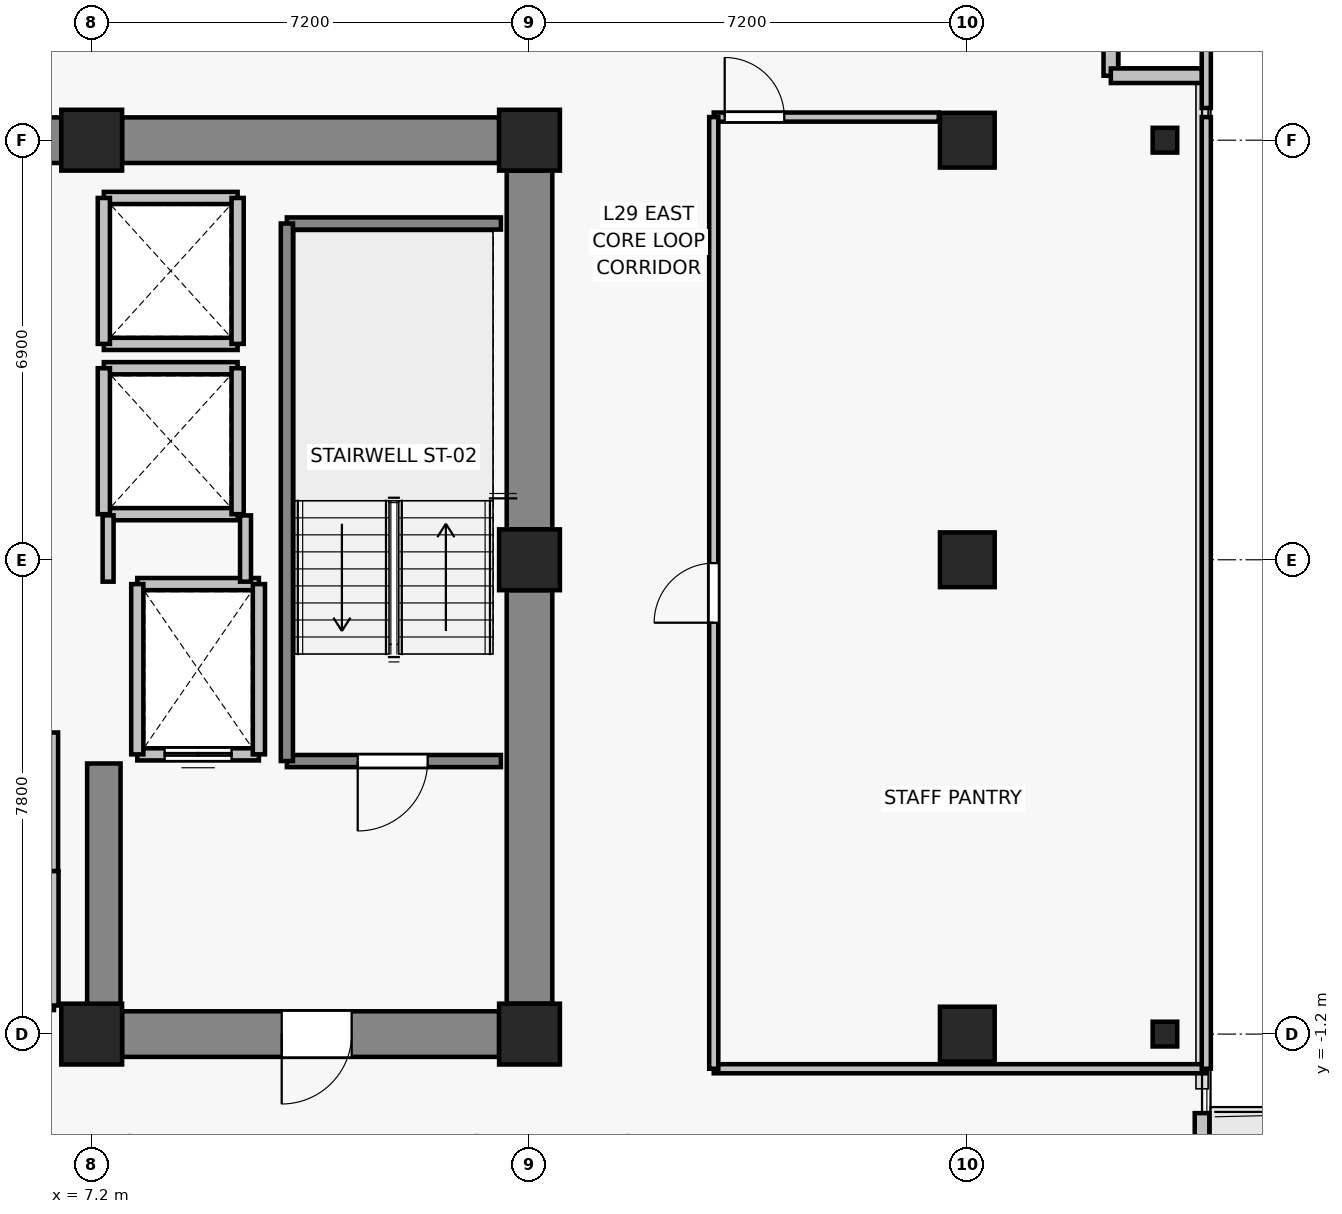
"""IFC4 building model, lengths in metres.
Left out: names, types, materials, properties, quantities, classifications, styles, units other than length and angle.
Written with IfcOpenShell. Run it as: python <this file> out.ifc"""

import sys

from ifc_helpers import new_model, si_unit, direction, frame, frame_2d, origin, origin_2d, place, context, subcontext, project, spatial, rectangle, i_section, extrude, source, transform, mapped, element, fill, save


model = new_model("IFC4")
c1 = context("Model", 3, precision=1e-05, world=origin(), true_north=direction((0.0, 1.0)))
c2 = subcontext(c1, "Body", "Model", "MODEL_VIEW")
j1 = project(units=[si_unit("LENGTHUNIT", "METRE"), si_unit("PLANEANGLEUNIT", "RADIAN")], contexts=[c1])
p1 = place(None, origin())
s1 = spatial("IfcSite", under=j1, at=p1, CompositionType="ELEMENT")
p2 = place(p1, origin())
s2 = spatial("IfcBuilding", under=s1, at=p2, CompositionType="ELEMENT")
p3 = place(p2, frame((0.0, 0.0, 106.6)))
s3 = spatial("IfcBuildingStorey", under=s2, at=p3, CompositionType="ELEMENT", Elevation=106.6)
for number, where, z_axis, x_axis in (
    (1, (7.2, -1.2, 0.0), (0.0, 0.0, 1.0), (1.0, 0.0, 0.0)),
    (2, (14.4, -1.2, 0.0), (0.0, 0.0, 1.0), (1.0, 0.0, 0.0)),
    (3, (14.4, 6.6, 0.0), (0.0, 0.0, 1.0), (1.0, 0.0, 0.0)),
    (4, (7.2, 13.5, 0.0), (0.0, 0.0, 1.0), (1.0, 0.0, 0.0)),
    (5, (14.4, 13.5, 0.0), (0.0, 0.0, 1.0), (1.0, 0.0, 0.0)),
):
    element("IfcColumn", number, at=place(p3, frame(where, z_axis=z_axis, x_axis=x_axis)), inside=s3, PredefinedType="COLUMN", context=c2, shape_type="SweptSolid", body=[
        extrude(rectangle(XDim=1.0, YDim=1.0, at=origin_2d()), origin(), (0.0, 0.0, 1.0), 3.3),
    ])
for number, where, z_axis, x_axis in (
    (6, (21.6, -1.2, 0.0), (0.0, 0.0, 1.0), (1.0, 0.0, 0.0)),
    (7, (21.6, 6.6, 0.0), (0.0, 0.0, 1.0), (1.0, 0.0, 0.0)),
    (8, (21.6, 13.5, 0.0), (0.0, 0.0, 1.0), (1.0, 0.0, 0.0)),
):
    element("IfcColumn", number, at=place(p3, frame(where, z_axis=z_axis, x_axis=x_axis)), inside=s3, PredefinedType="COLUMN", context=c2, shape_type="SweptSolid", body=[
        extrude(rectangle(XDim=0.9, YDim=0.9, at=origin_2d()), origin(), (0.0, 0.0, 1.0), 3.3),
    ])
for number, where, z_axis, x_axis in (
    (9, (24.85, -1.2, 0.0), (0.0, 0.0, 1.0), (1.0, 0.0, 0.0)),
    (10, (24.85, 13.5, 0.0), (0.0, 0.0, 1.0), (1.0, 0.0, 0.0)),
):
    element("IfcColumn", number, at=place(p3, frame(where, z_axis=z_axis, x_axis=x_axis)), inside=s3, PredefinedType="COLUMN", context=c2, shape_type="SweptSolid", body=[
        extrude(i_section(OverallWidth=0.404, OverallDepth=0.407, WebThickness=0.022, FlangeThickness=0.032, FilletRadius=0.015, at=origin_2d()), origin(), (0.0, 0.0, 1.0), 3.3),
    ])
p4 = place(p3, frame((-6.7, 13.5, 0.0), z_axis=(0.0, 0.0, 1.0), x_axis=(1.0, 0.0, 0.0)))
e11 = element("IfcWall", 11, at=p4, inside=s3, PredefinedType="SHEAR", context=c2, shape_type="SweptSolid", body=[
    extrude(rectangle(XDim=13.4, YDim=0.75, at=frame_2d((6.7, 0.0))), origin(), (0.0, 0.0, 1.0), 3.075),
])
p5 = place(p3, frame((7.7, 13.5, 0.0), z_axis=(0.0, 0.0, 1.0), x_axis=(1.0, 0.0, 0.0)))
e12 = element("IfcWall", 12, at=p5, inside=s3, PredefinedType="SHEAR", context=c2, shape_type="SweptSolid", body=[
    extrude(rectangle(XDim=6.2, YDim=0.75, at=frame_2d((3.1, 0.0))), origin(), (0.0, 0.0, 1.0), 3.075),
])
p6 = place(p3, frame((14.4, -0.7, 0.0), z_axis=(0.0, 0.0, 1.0), x_axis=(0.0, 1.0, 0.0)))
e13 = element("IfcWall", 13, at=p6, inside=s3, PredefinedType="SHEAR", context=c2, shape_type="SweptSolid", body=[
    extrude(rectangle(XDim=6.8, YDim=0.75, at=frame_2d((3.4, 0.0))), origin(), (0.0, 0.0, 1.0), 3.075),
])
p7 = place(p3, frame((14.4, 7.1, 0.0), z_axis=(0.0, 0.0, 1.0), x_axis=(0.0, 1.0, 0.0)))
e14 = element("IfcWall", 14, at=p7, inside=s3, PredefinedType="SHEAR", context=c2, shape_type="SweptSolid", body=[
    extrude(rectangle(XDim=5.9, YDim=0.75, at=frame_2d((2.95, 0.0))), origin(), (0.0, 0.0, 1.0), 3.075),
])
p8 = place(p3, frame((13.9, -1.2, 0.0), z_axis=(0.0, 0.0, 1.0), x_axis=(-1.0, 0.0, 0.0)))
e15 = element("IfcWall", 15, at=p8, inside=s3, PredefinedType="SHEAR", context=c2, shape_type="SweptSolid", body=[
    extrude(rectangle(XDim=6.2, YDim=0.75, at=frame_2d((3.1, 0.0))), origin(), (0.0, 0.0, 1.0), 3.075),
])
p9 = place(p8, frame((2.425, 0.0, 0.0)))
e16 = element("IfcOpeningElement", 16, at=p9, cuts=e15, PredefinedType="OPENING", context=c2, shape_type="SweptSolid", body=[
    extrude(rectangle(XDim=1.15, YDim=2.15, at=frame_2d((0.575, 1.075))), frame((0.0, 0.385, 0.0), z_axis=(0.0, -1.0, 0.0), x_axis=(1.0, 0.0, 0.0)), (0.0, 0.0, 1.0), 0.77),
])
p10 = place(p3, frame((7.4, -0.825, 0.0), z_axis=(0.0, 0.0, 1.0), x_axis=(0.0, 1.0, 0.0)))
e17 = element("IfcWall", 17, at=p10, inside=s3, PredefinedType="SHEAR", context=c2, shape_type="SweptSolid", body=[
    extrude(rectangle(XDim=4.075, YDim=0.55, at=frame_2d((2.038, 0.0))), origin(), (0.0, 0.0, 1.0), 3.075),
])
p11 = place(p3, frame((25.46, -2.5, 0.0), z_axis=(0.0, 0.0, 1.0), x_axis=(0.0, -1.0, 0.0)))
e18 = element("IfcWall", 18, at=p11, inside=s3, PredefinedType="SOLIDWALL", context=c2, shape_type="SweptSolid", body=[
    extrude(rectangle(XDim=5.8, YDim=0.24, at=frame_2d((2.9, 0.0))), origin(), (0.0, 0.0, 1.0), 3.075),
])
p12 = place(p11, frame((0.696, 0.0, 0.0)))
e19 = element("IfcOpeningElement", 19, at=p12, cuts=e18, PredefinedType="OPENING", context=c2, shape_type="SweptSolid", body=[
    extrude(rectangle(XDim=1.0, YDim=2.2, at=frame_2d((0.5, 1.1))), frame((0.0, 0.13, 0.0), z_axis=(0.0, -1.0, 0.0), x_axis=(1.0, 0.0, 0.0)), (0.0, 0.0, 1.0), 0.26),
])
p13 = place(p11, frame((2.046, 0.0, 0.85)))
e20 = element("IfcOpeningElement", 20, at=p13, cuts=e18, PredefinedType="OPENING", context=c2, shape_type="SweptSolid", body=[
    extrude(rectangle(XDim=0.9, YDim=1.35, at=frame_2d((0.45, 0.675))), frame((0.0, 0.13, 0.0), z_axis=(0.0, -1.0, 0.0), x_axis=(1.0, 0.0, 0.0)), (0.0, 0.0, 1.0), 0.26),
])
for number, where, z_axis, x_axis in (
    (21, (23.96, 14.56, 0.0), (0.0, 0.0, 1.0), (0.0, 1.0, 0.0)),
    (22, (25.46, 14.56, 0.0), (0.0, 0.0, 1.0), (-1.0, 0.0, 0.0)),
):
    element("IfcWall", number, at=place(p3, frame(where, z_axis=z_axis, x_axis=x_axis)), inside=s3, PredefinedType="SOLIDWALL", context=c2, shape_type="SweptSolid", body=[
        extrude(rectangle(XDim=1.5, YDim=0.24, at=frame_2d((0.75, 0.0))), origin(), (0.0, 0.0, 1.0), 3.075),
    ])
p14 = place(p3, frame((9.95, 3.4, 0.0), z_axis=(0.0, 0.0, 1.0), x_axis=(-1.0, 0.0, 0.0)))
e23 = element("IfcWall", 23, at=p14, inside=s3, PredefinedType="SOLIDWALL", context=c2, shape_type="SweptSolid", body=[
    extrude(rectangle(XDim=2.0, YDim=0.2, at=frame_2d((1.0, 0.0))), origin(), (0.0, 0.0, 1.0), 3.075),
])
p15 = place(p14, frame((0.45, 0.0, 0.0)))
e24 = element("IfcOpeningElement", 24, at=p15, cuts=e23, PredefinedType="OPENING", context=c2, shape_type="SweptSolid", body=[
    extrude(rectangle(XDim=1.1, YDim=2.2, at=frame_2d((0.55, 1.1))), frame((0.0, 0.11, 0.0), z_axis=(0.0, -1.0, 0.0), x_axis=(1.0, 0.0, 0.0)), (0.0, 0.0, 1.0), 0.22),
])
p16 = place(p3, frame((7.95, 6.2, 0.0), z_axis=(0.0, 0.0, 1.0), x_axis=(1.0, 0.0, 0.0)))
e25 = element("IfcWall", 25, at=p16, inside=s3, PredefinedType="SOLIDWALL", context=c2, shape_type="SweptSolid", body=[
    extrude(rectangle(XDim=2.0, YDim=0.2, at=frame_2d((1.0, 0.0))), origin(), (0.0, 0.0, 1.0), 3.075),
])
for number, where, z_axis, x_axis in (
    (26, (7.95, 3.4, 0.0), (0.0, 0.0, 1.0), (0.0, 1.0, 0.0)),
    (27, (9.95, 6.2, 0.0), (0.0, 0.0, 1.0), (0.0, -1.0, 0.0)),
):
    element("IfcWall", number, at=place(p3, frame(where, z_axis=z_axis, x_axis=x_axis)), inside=s3, PredefinedType="SOLIDWALL", context=c2, shape_type="SweptSolid", body=[
        extrude(rectangle(XDim=2.8, YDim=0.2, at=frame_2d((1.4, 0.0))), origin(), (0.0, 0.0, 1.0), 3.075),
    ])
for number, where, z_axis, x_axis in (
    (28, (9.6, 7.35, 0.0), (0.0, 0.0, 1.0), (-1.0, 0.0, 0.0)),
    (29, (7.4, 9.75, 0.0), (0.0, 0.0, 1.0), (1.0, 0.0, 0.0)),
):
    element("IfcWall", number, at=place(p3, frame(where, z_axis=z_axis, x_axis=x_axis)), inside=s3, PredefinedType="SOLIDWALL", context=c2, shape_type="SweptSolid", body=[
        extrude(rectangle(XDim=2.2, YDim=0.2, at=frame_2d((1.1, 0.0))), origin(), (0.0, 0.0, 1.0), 2.515),
    ])
p17 = place(p3, frame((7.4, 7.35, 0.0), z_axis=(0.0, 0.0, 1.0), x_axis=(0.0, 1.0, 0.0)))
e30 = element("IfcWall", 30, at=p17, inside=s3, PredefinedType="SOLIDWALL", context=c2, shape_type="SweptSolid", body=[
    extrude(rectangle(XDim=2.4, YDim=0.2, at=frame_2d((1.2, 0.0))), origin(), (0.0, 0.0, 1.0), 2.515),
])
p18 = place(p3, frame((9.6, 9.75, 0.0), z_axis=(0.0, 0.0, 1.0), x_axis=(0.0, -1.0, 0.0)))
e31 = element("IfcWall", 31, at=p18, inside=s3, PredefinedType="SOLIDWALL", context=c2, shape_type="SweptSolid", body=[
    extrude(rectangle(XDim=2.4, YDim=0.2, at=frame_2d((1.2, 0.0))), origin(), (0.0, 0.0, 1.0), 3.075),
])
for number, where, z_axis, x_axis in (
    (32, (9.6, 10.15, 0.0), (0.0, 0.0, 1.0), (-1.0, 0.0, 0.0)),
    (33, (7.4, 12.55, 0.0), (0.0, 0.0, 1.0), (1.0, 0.0, 0.0)),
):
    element("IfcWall", number, at=place(p3, frame(where, z_axis=z_axis, x_axis=x_axis)), inside=s3, PredefinedType="SOLIDWALL", context=c2, shape_type="SweptSolid", body=[
        extrude(rectangle(XDim=2.2, YDim=0.2, at=frame_2d((1.1, 0.0))), origin(), (0.0, 0.0, 1.0), 2.515),
    ])
p19 = place(p3, frame((7.4, 10.15, 0.0), z_axis=(0.0, 0.0, 1.0), x_axis=(0.0, 1.0, 0.0)))
e34 = element("IfcWall", 34, at=p19, inside=s3, PredefinedType="SOLIDWALL", context=c2, shape_type="SweptSolid", body=[
    extrude(rectangle(XDim=2.4, YDim=0.2, at=frame_2d((1.2, 0.0))), origin(), (0.0, 0.0, 1.0), 2.515),
])
p20 = place(p3, frame((9.6, 12.55, 0.0), z_axis=(0.0, 0.0, 1.0), x_axis=(0.0, -1.0, 0.0)))
e35 = element("IfcWall", 35, at=p20, inside=s3, PredefinedType="SOLIDWALL", context=c2, shape_type="SweptSolid", body=[
    extrude(rectangle(XDim=2.4, YDim=0.2, at=frame_2d((1.2, 0.0))), origin(), (0.0, 0.0, 1.0), 3.075),
])
p21 = place(p3, frame((13.93, 3.29, 0.0), z_axis=(0.0, 0.0, 1.0), x_axis=(-1.0, 0.0, 0.0)))
e36 = element("IfcWall", 36, at=p21, inside=s3, PredefinedType="SOLIDWALL", context=c2, shape_type="SweptSolid", body=[
    extrude(rectangle(XDim=3.52, YDim=0.2, at=frame_2d((1.76, 0.0))), origin(), (0.0, 0.0, 1.0), 3.075),
])
p22 = place(p21, frame((1.205, 0.0, 0.0)))
e37 = element("IfcOpeningElement", 37, at=p22, cuts=e36, PredefinedType="OPENING", context=c2, shape_type="SweptSolid", body=[
    extrude(rectangle(XDim=1.15, YDim=2.15, at=frame_2d((0.575, 1.075))), frame((0.0, 0.11, 0.0), z_axis=(0.0, -1.0, 0.0), x_axis=(1.0, 0.0, 0.0)), (0.0, 0.0, 1.0), 0.22),
])
p23 = place(p3, frame((10.41, 12.13, 0.0), z_axis=(0.0, 0.0, 1.0), x_axis=(1.0, 0.0, 0.0)))
e38 = element("IfcWall", 38, at=p23, inside=s3, PredefinedType="SOLIDWALL", context=c2, shape_type="SweptSolid", body=[
    extrude(rectangle(XDim=3.52, YDim=0.2, at=frame_2d((1.76, 0.0))), origin(), (0.0, 0.0, 1.0), 3.075),
])
p24 = place(p3, frame((10.41, 3.29, 0.0), z_axis=(0.0, 0.0, 1.0), x_axis=(0.0, 1.0, 0.0)))
e39 = element("IfcWall", 39, at=p24, inside=s3, PredefinedType="SOLIDWALL", context=c2, shape_type="SweptSolid", body=[
    extrude(rectangle(XDim=8.84, YDim=0.2, at=frame_2d((4.42, 0.0))), origin(), (0.0, 0.0, 1.0), 3.075),
])
p25 = place(p3, frame((7.47, 6.24, 0.0), z_axis=(0.0, 0.0, 1.0), x_axis=(0.0, 1.0, 0.0)))
e40 = element("IfcWall", 40, at=p25, inside=s3, PredefinedType="PARTITIONING", context=c2, shape_type="SweptSolid", body=[
    extrude(rectangle(XDim=1.09, YDim=0.18, at=frame_2d((0.545, 0.0))), origin(), (0.0, 0.0, 1.0), 2.515),
])
p26 = place(p3, frame((9.73, 7.33, 0.0), z_axis=(0.0, 0.0, 1.0), x_axis=(0.0, -1.0, 0.0)))
e41 = element("IfcWall", 41, at=p26, inside=s3, PredefinedType="PARTITIONING", context=c2, shape_type="SweptSolid", body=[
    extrude(rectangle(XDim=1.09, YDim=0.18, at=frame_2d((0.545, 0.0))), origin(), (0.0, 0.0, 1.0), 3.075),
])
p27 = place(p3, frame((6.58, 1.48, 0.0), z_axis=(0.0, 0.0, 1.0), x_axis=(-1.0, 0.0, 0.0)))
e42 = element("IfcWall", 42, at=p27, inside=s3, PredefinedType="PARTITIONING", context=c2, shape_type="SweptSolid", body=[
    extrude(rectangle(XDim=5.11, YDim=0.135, at=frame_2d((2.555, 0.0))), origin(), (0.0, 0.0, 1.0), 3.075),
])
p28 = place(p3, frame((6.58, 3.76, 0.0), z_axis=(0.0, 0.0, 1.0), x_axis=(0.0, -1.0, 0.0)))
e43 = element("IfcWall", 43, at=p28, inside=s3, PredefinedType="PARTITIONING", context=c2, shape_type="SweptSolid", body=[
    extrude(rectangle(XDim=2.28, YDim=0.135, at=frame_2d((1.14, 0.0))), origin(), (0.0, 0.0, 1.0), 3.075),
])
p29 = place(p3, frame((6.58, -0.73, 0.0), z_axis=(0.0, 0.0, 1.0), x_axis=(-1.0, 0.0, 0.0)))
e44 = element("IfcWall", 44, at=p29, inside=s3, PredefinedType="PARTITIONING", context=c2, shape_type="SweptSolid", body=[
    extrude(rectangle(XDim=2.4, YDim=0.15, at=frame_2d((1.2, 0.0))), origin(), (0.0, 0.0, 1.0), 3.075),
])
p30 = place(p29, frame((0.76, 0.0, 0.0)))
e45 = element("IfcOpeningElement", 45, at=p30, cuts=e44, PredefinedType="OPENING", context=c2, shape_type="SweptSolid", body=[
    extrude(rectangle(XDim=0.88, YDim=2.1, at=frame_2d((0.44, 1.05))), frame((0.0, 0.085, 0.0), z_axis=(0.0, -1.0, 0.0), x_axis=(1.0, 0.0, 0.0)), (0.0, 0.0, 1.0), 0.17),
])
p31 = place(p3, frame((6.58, 1.48, 0.0), z_axis=(0.0, 0.0, 1.0), x_axis=(0.0, -1.0, 0.0)))
e46 = element("IfcWall", 46, at=p31, inside=s3, PredefinedType="PARTITIONING", context=c2, shape_type="SweptSolid", body=[
    extrude(rectangle(XDim=2.21, YDim=0.15, at=frame_2d((1.105, 0.0))), origin(), (0.0, 0.0, 1.0), 3.075),
])
p32 = place(p3, frame((25.53, -1.77, 0.0), z_axis=(0.0, 0.0, 1.0), x_axis=(-1.0, 0.0, 0.0)))
e47 = element("IfcWall", 47, at=p32, inside=s3, PredefinedType="PARTITIONING", context=c2, shape_type="SweptSolid", body=[
    extrude(rectangle(XDim=8.1, YDim=0.15, at=frame_2d((4.05, 0.0))), origin(), (0.0, 0.0, 1.0), 2.515),
])
p33 = place(p3, frame((17.43, 13.88, 0.0), z_axis=(0.0, 0.0, 1.0), x_axis=(1.0, 0.0, 0.0)))
e48 = element("IfcWall", 48, at=p33, inside=s3, PredefinedType="PARTITIONING", context=c2, shape_type="SweptSolid", body=[
    extrude(rectangle(XDim=3.7, YDim=0.15, at=frame_2d((1.85, 0.0))), origin(), (0.0, 0.0, 1.0), 3.075),
])
p34 = place(p33, frame((0.18, 0.0, 0.0)))
e49 = element("IfcOpeningElement", 49, at=p34, cuts=e48, PredefinedType="OPENING", context=c2, shape_type="SweptSolid", body=[
    extrude(rectangle(XDim=0.98, YDim=2.15, at=frame_2d((0.49, 1.075))), frame((0.0, 0.085, 0.0), z_axis=(0.0, -1.0, 0.0), x_axis=(1.0, 0.0, 0.0)), (0.0, 0.0, 1.0), 0.17),
])
p35 = place(p3, frame((17.43, -1.77, 0.0), z_axis=(0.0, 0.0, 1.0), x_axis=(0.0, 1.0, 0.0)))
e50 = element("IfcWall", 50, at=p35, inside=s3, PredefinedType="PARTITIONING", context=c2, shape_type="SweptSolid", body=[
    extrude(rectangle(XDim=15.65, YDim=0.15, at=frame_2d((7.825, 0.0))), origin(), (0.0, 0.0, 1.0), 2.515),
])
p36 = place(p35, frame((7.335, 0.0, 0.0)))
e51 = element("IfcOpeningElement", 51, at=p36, cuts=e50, PredefinedType="OPENING", context=c2, shape_type="SweptSolid", body=[
    extrude(rectangle(XDim=0.98, YDim=2.15, at=frame_2d((0.49, 1.075))), frame((0.0, 0.085, 0.0), z_axis=(0.0, -1.0, 0.0), x_axis=(1.0, 0.0, 0.0)), (0.0, 0.0, 1.0), 0.17),
])
p37 = place(p3, frame((25.53, 13.88, 0.0), z_axis=(0.0, 0.0, 1.0), x_axis=(0.0, -1.0, 0.0)))
e52 = element("IfcWall", 52, at=p37, inside=s3, PredefinedType="PARTITIONING", context=c2, shape_type="SweptSolid", body=[
    extrude(rectangle(XDim=15.65, YDim=0.15, at=frame_2d((7.825, 0.0))), origin(), (0.0, 0.0, 1.0), 3.075),
])
p38 = place(p3, frame((25.53, 17.63, 0.0), z_axis=(0.0, 0.0, 1.0), x_axis=(0.0, -1.0, 0.0)))
e53 = element("IfcWall", 53, at=p38, inside=s3, PredefinedType="PARTITIONING", context=c2, shape_type="SweptSolid", body=[
    extrude(rectangle(XDim=3.6, YDim=0.15, at=frame_2d((1.8, 0.0))), origin(), (0.0, 0.0, 1.0), 3.075),
])
m1 = source(origin(), c2, "Body", "SweptSolid", [
    extrude(rectangle(XDim=1.1, YDim=2.2, at=frame_2d((0.55, 1.1))), frame((0.0, 0.025, 0.0), z_axis=(0.0, -1.0, 0.0), x_axis=(1.0, 0.0, 0.0)), (0.0, 0.0, 1.0), 0.05),
])
p39 = place(p15, origin())
e54 = element("IfcDoor", 54, at=p39, inside=s3, OperationType="DOUBLE_DOOR_SLIDING", PredefinedType="DOOR", context=c2, shape_type="MappedRepresentation", body=[
    mapped(m1, transform((0.0, 0.0, 0.0), x_axis=(1.0, 0.0, 0.0), y_axis=(0.0, 1.0, 0.0), z_axis=(0.0, 0.0, 1.0), scale=1.0)),
])
fill(e24, e54)
m2 = source(origin(), c2, "Body", "SweptSolid", [
    extrude(rectangle(XDim=1.15, YDim=2.15, at=frame_2d((0.575, 1.075))), frame((0.0, 0.025, 0.0), z_axis=(0.0, -1.0, 0.0), x_axis=(1.0, 0.0, 0.0)), (0.0, 0.0, 1.0), 0.05),
])
p40 = place(p22, origin())
e55 = element("IfcDoor", 55, at=p40, inside=s3, OperationType="SINGLE_SWING_RIGHT", PredefinedType="DOOR", context=c2, shape_type="MappedRepresentation", body=[
    mapped(m2, transform((0.0, 0.0, 0.0), x_axis=(1.0, 0.0, 0.0), y_axis=(0.0, 1.0, 0.0), z_axis=(0.0, 0.0, 1.0), scale=1.0)),
])
fill(e37, e55)
p41 = place(p9, origin())
e56 = element("IfcDoor", 56, at=p41, inside=s3, OperationType="SINGLE_SWING_RIGHT", PredefinedType="DOOR", context=c2, shape_type="MappedRepresentation", body=[
    mapped(m2, transform((0.0, 0.0, 0.0), x_axis=(1.0, 0.0, 0.0), y_axis=(0.0, 1.0, 0.0), z_axis=(0.0, 0.0, 1.0), scale=1.0)),
])
fill(e16, e56)
m3 = source(origin(), c2, "Body", "SweptSolid", [
    extrude(rectangle(XDim=0.98, YDim=2.15, at=frame_2d((0.49, 1.075))), frame((0.0, 0.025, 0.0), z_axis=(0.0, -1.0, 0.0), x_axis=(1.0, 0.0, 0.0)), (0.0, 0.0, 1.0), 0.05),
])
p42 = place(p36, origin())
e57 = element("IfcDoor", 57, at=p42, inside=s3, OperationType="SINGLE_SWING_LEFT", PredefinedType="DOOR", context=c2, shape_type="MappedRepresentation", body=[
    mapped(m3, transform((0.0, 0.0, 0.0), x_axis=(1.0, 0.0, 0.0), y_axis=(0.0, 1.0, 0.0), z_axis=(0.0, 0.0, 1.0), scale=1.0)),
])
fill(e51, e57)
p43 = place(p34, origin())
e58 = element("IfcDoor", 58, at=p43, inside=s3, OperationType="SINGLE_SWING_LEFT", PredefinedType="DOOR", context=c2, shape_type="MappedRepresentation", body=[
    mapped(m3, transform((0.0, 0.0, 0.0), x_axis=(1.0, 0.0, 0.0), y_axis=(0.0, 1.0, 0.0), z_axis=(0.0, 0.0, 1.0), scale=1.0)),
])
fill(e49, e58)
save(model, sys.argv[1])
